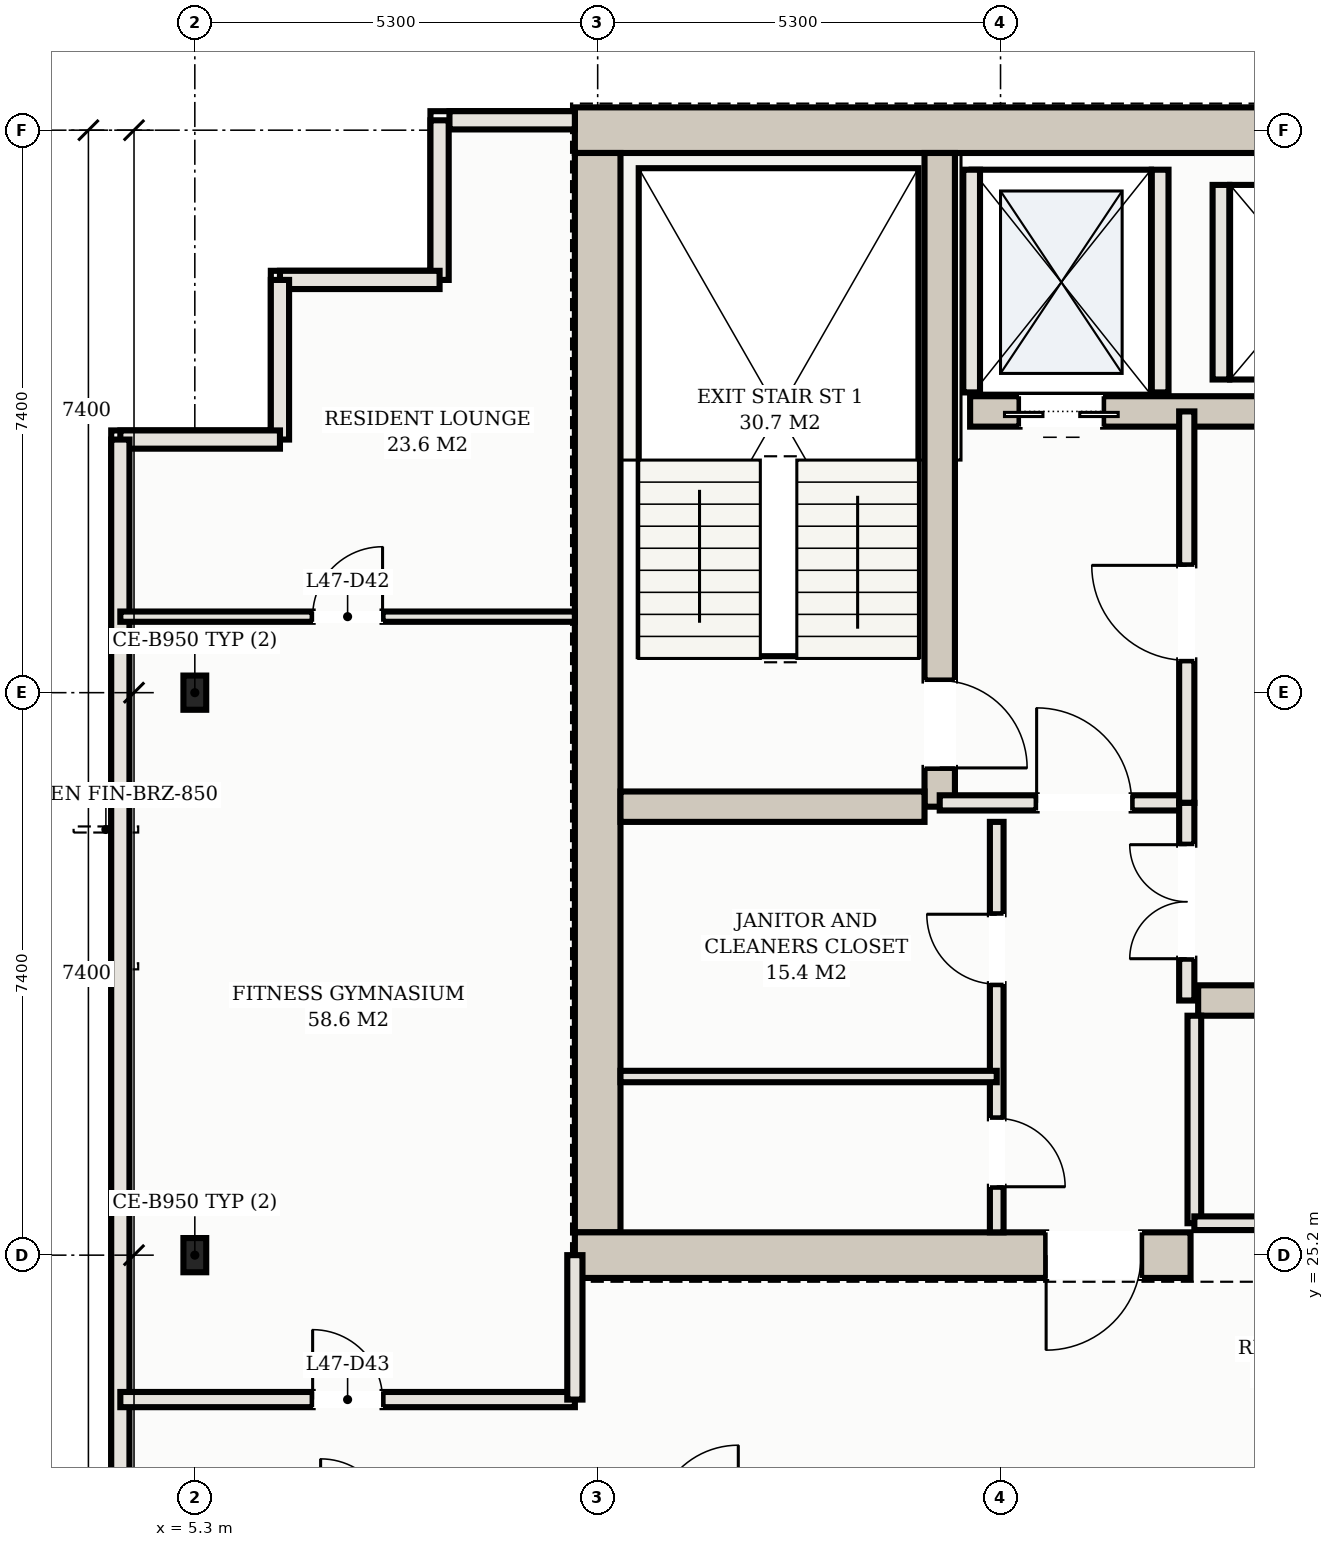
"""IFC4 building model, lengths in metres.
Left out: names, types, materials, properties, quantities, classifications, styles, units other than length and angle.
Written with IfcOpenShell. Run it as: python <this file> out.ifc"""

import sys

from ifc_helpers import new_model, si_unit, direction, frame, frame_2d, origin, origin_2d, place, context, subcontext, project, spatial, rectangle, hollow_rectangle, extrude, element, fill, save


model = new_model("IFC4")
c1 = context("Model", 3, precision=1e-05, world=origin(), true_north=direction((0.0, 1.0)))
c2 = subcontext(c1, "Body", "Model", "MODEL_VIEW")
j1 = project(units=[si_unit("LENGTHUNIT", "METRE"), si_unit("PLANEANGLEUNIT", "RADIAN")], contexts=[c1])
p1 = place(None, origin())
s1 = spatial("IfcSite", under=j1, at=p1, CompositionType="ELEMENT")
p2 = place(p1, origin())
s2 = spatial("IfcBuilding", under=s1, at=p2, CompositionType="ELEMENT")
p3 = place(p2, frame((0.0, 0.0, 172.2)))
s3 = spatial("IfcBuildingStorey", under=s2, at=p3, CompositionType="ELEMENT", Elevation=172.2)
p4 = place(p3, frame((10.3, 40.0, 0.0), z_axis=(0.0, 0.0, 1.0), x_axis=(1.0, 0.0, 0.0)))
e1 = element("IfcWall", 1, at=p4, inside=s3, PredefinedType="SHEAR", context=c2, shape_type="SweptSolid", body=[
    extrude(rectangle(XDim=32.4, YDim=0.6, at=frame_2d((16.2, 0.0))), origin(), (0.0, 0.0, 1.0), 3.1),
])
p5 = place(p3, frame((10.6, 25.5, 0.0), z_axis=(0.0, 0.0, 1.0), x_axis=(0.0, 1.0, 0.0)))
e2 = element("IfcWall", 2, at=p5, inside=s3, PredefinedType="SHEAR", context=c2, shape_type="SweptSolid", body=[
    extrude(rectangle(XDim=14.2, YDim=0.6, at=frame_2d((7.1, 0.0))), origin(), (0.0, 0.0, 1.0), 3.1),
])
p6 = place(p3, frame((10.3, 25.2, 0.0), z_axis=(0.0, 0.0, 1.0), x_axis=(1.0, 0.0, 0.0)))
e3 = element("IfcWall", 3, at=p6, inside=s3, PredefinedType="SHEAR", context=c2, shape_type="SweptSolid", body=[
    extrude(rectangle(XDim=8.1, YDim=0.6, at=frame_2d((4.05, 0.0))), origin(), (0.0, 0.0, 1.0), 3.1),
])
p7 = place(p6, frame((6.2, 0.0, 0.0)))
e4 = element("IfcOpeningElement", 4, at=p7, cuts=e3, PredefinedType="OPENING", context=c2, shape_type="SweptSolid", body=[
    extrude(rectangle(XDim=1.25, YDim=2.2, at=frame_2d((0.625, 1.1))), frame((0.0, 0.31, 0.0), z_axis=(0.0, -1.0, 0.0), x_axis=(1.0, 0.0, 0.0)), (0.0, 0.0, 1.0), 0.62),
])
p8 = place(p3, frame((15.1, 31.1, 0.0), z_axis=(0.0, 0.0, 1.0), x_axis=(0.0, 1.0, 0.0)))
e5 = element("IfcWall", 5, at=p8, inside=s3, PredefinedType="SHEAR", context=c2, shape_type="SweptSolid", body=[
    extrude(rectangle(XDim=8.6, YDim=0.4, at=frame_2d((4.3, 0.0))), origin(), (0.0, 0.0, 1.0), 3.1),
])
p9 = place(p8, frame((0.51, 0.0, 0.0)))
e6 = element("IfcOpeningElement", 6, at=p9, cuts=e5, PredefinedType="OPENING", context=c2, shape_type="SweptSolid", body=[
    extrude(rectangle(XDim=1.15, YDim=2.2, at=frame_2d((0.575, 1.1))), frame((0.0, 0.21, 0.0), z_axis=(0.0, -1.0, 0.0), x_axis=(1.0, 0.0, 0.0)), (0.0, 0.0, 1.0), 0.42),
])
p10 = place(p3, frame((10.9, 31.1, 0.0), z_axis=(0.0, 0.0, 1.0), x_axis=(1.0, 0.0, 0.0)))
e7 = element("IfcWall", 7, at=p10, inside=s3, PredefinedType="SHEAR", context=c2, shape_type="SweptSolid", body=[
    extrude(rectangle(XDim=4.0, YDim=0.4, at=frame_2d((2.0, 0.0))), origin(), (0.0, 0.0, 1.0), 3.1),
])
p11 = place(p3, frame((15.5, 36.3, 0.0), z_axis=(0.0, 0.0, 1.0), x_axis=(1.0, 0.0, 0.0)))
e8 = element("IfcWall", 8, at=p11, inside=s3, PredefinedType="SHEAR", context=c2, shape_type="SweptSolid", body=[
    extrude(rectangle(XDim=22.0, YDim=0.4, at=frame_2d((11.0, 0.0))), origin(), (0.0, 0.0, 1.0), 3.1),
])
p12 = place(p11, frame((0.65, 0.0, 0.0)))
e9 = element("IfcOpeningElement", 9, at=p12, cuts=e8, PredefinedType="OPENING", context=c2, shape_type="SweptSolid", body=[
    extrude(rectangle(XDim=1.1, YDim=2.15, at=frame_2d((0.55, 1.075))), frame((0.0, 0.21, 0.0), z_axis=(0.0, -1.0, 0.0), x_axis=(1.0, 0.0, 0.0)), (0.0, 0.0, 1.0), 0.42),
])
p13 = place(p11, frame((20.25, 0.0, 0.0)))
e10 = element("IfcOpeningElement", 10, at=p13, cuts=e8, PredefinedType="OPENING", context=c2, shape_type="SweptSolid", body=[
    extrude(rectangle(XDim=1.1, YDim=2.15, at=frame_2d((0.55, 1.075))), frame((0.0, 0.21, 0.0), z_axis=(0.0, -1.0, 0.0), x_axis=(1.0, 0.0, 0.0)), (0.0, 0.0, 1.0), 0.42),
])
p14 = place(p11, frame((17.05, 0.0, 0.0)))
e11 = element("IfcOpeningElement", 11, at=p14, cuts=e8, PredefinedType="OPENING", context=c2, shape_type="SweptSolid", body=[
    extrude(rectangle(XDim=1.3, YDim=2.2, at=frame_2d((0.65, 1.1))), frame((0.0, 0.21, 0.0), z_axis=(0.0, -1.0, 0.0), x_axis=(1.0, 0.0, 0.0)), (0.0, 0.0, 1.0), 0.42),
])
p15 = place(p3, frame((18.5, 28.55, 0.0), z_axis=(0.0, 0.0, 1.0), x_axis=(1.0, 0.0, 0.0)))
e12 = element("IfcWall", 12, at=p15, inside=s3, PredefinedType="SHEAR", context=c2, shape_type="SweptSolid", body=[
    extrude(rectangle(XDim=16.0, YDim=0.4, at=frame_2d((8.0, 0.0))), origin(), (0.0, 0.0, 1.0), 3.1),
])
p16 = place(p15, frame((8.95, 0.0, 0.0)))
e13 = element("IfcOpeningElement", 13, at=p16, cuts=e12, PredefinedType="OPENING", context=c2, shape_type="SweptSolid", body=[
    extrude(rectangle(XDim=1.1, YDim=2.15, at=frame_2d((0.55, 1.075))), frame((0.0, 0.21, 0.0), z_axis=(0.0, -1.0, 0.0), x_axis=(1.0, 0.0, 0.0)), (0.0, 0.0, 1.0), 0.42),
])
p17 = place(p15, frame((11.55, 0.0, 0.0)))
e14 = element("IfcOpeningElement", 14, at=p17, cuts=e12, PredefinedType="OPENING", context=c2, shape_type="SweptSolid", body=[
    extrude(rectangle(XDim=1.1, YDim=2.15, at=frame_2d((0.55, 1.075))), frame((0.0, 0.21, 0.0), z_axis=(0.0, -1.0, 0.0), x_axis=(1.0, 0.0, 0.0)), (0.0, 0.0, 1.0), 0.42),
])
p18 = place(p15, frame((14.15, 0.0, 0.0)))
e15 = element("IfcOpeningElement", 15, at=p18, cuts=e12, PredefinedType="OPENING", context=c2, shape_type="SweptSolid", body=[
    extrude(rectangle(XDim=1.1, YDim=2.15, at=frame_2d((0.55, 1.075))), frame((0.0, 0.21, 0.0), z_axis=(0.0, -1.0, 0.0), x_axis=(1.0, 0.0, 0.0)), (0.0, 0.0, 1.0), 0.42),
])
for number, where, z_axis, x_axis in (
    (16, (5.3, 25.2, 0.0), (0.0, 0.0, 1.0), (1.0, 0.0, 0.0)),
    (17, (5.3, 32.6, 0.0), (0.0, 0.0, 1.0), (1.0, 0.0, 0.0)),
):
    element("IfcColumn", number, at=place(p3, frame(where, z_axis=z_axis, x_axis=x_axis)), inside=s3, PredefinedType="COLUMN", context=c2, shape_type="SweptSolid", body=[
        extrude(hollow_rectangle(XDim=0.3, YDim=0.45, WallThickness=0.016, at=origin_2d()), origin(), (0.0, 0.0, 1.0), 3.3),
    ])
for number, where, z_axis, x_axis in (
    (18, (15.52, 36.55, 0.0), (0.0, 0.0, 1.0), (0.0, 1.0, 0.0)),
    (19, (18.0, 36.55, 0.0), (0.0, 0.0, 1.0), (0.0, 1.0, 0.0)),
):
    element("IfcWall", number, at=place(p3, frame(where, z_axis=z_axis, x_axis=x_axis)), inside=s3, PredefinedType="SOLIDWALL", context=c2, shape_type="SweptSolid", body=[
        extrude(rectangle(XDim=2.93, YDim=0.22, at=frame_2d((1.465, 0.0))), origin(), (0.0, 0.0, 1.0), 3.1),
    ])
p19 = place(p3, frame((18.8, 36.72, 0.0), z_axis=(0.0, 0.0, 1.0), x_axis=(0.0, 1.0, 0.0)))
e20 = element("IfcWall", 20, at=p19, inside=s3, PredefinedType="SOLIDWALL", context=c2, shape_type="SweptSolid", body=[
    extrude(rectangle(XDim=2.56, YDim=0.22, at=frame_2d((1.28, 0.0))), origin(), (0.0, 0.0, 1.0), 3.1),
])
p20 = place(p3, frame((10.3, 40.13, 0.0), z_axis=(0.0, 0.0, 1.0), x_axis=(-1.0, 0.0, 0.0)))
e21 = element("IfcWall", 21, at=p20, inside=s3, PredefinedType="SOLIDWALL", context=c2, shape_type="SweptSolid", body=[
    extrude(rectangle(XDim=1.65, YDim=0.24, at=frame_2d((0.825, 0.0))), origin(), (0.0, 0.0, 1.0), 3.1),
])
p21 = place(p3, frame((8.52, 40.13, 0.0), z_axis=(0.0, 0.0, 1.0), x_axis=(0.0, -1.0, 0.0)))
e22 = element("IfcWall", 22, at=p21, inside=s3, PredefinedType="SOLIDWALL", context=c2, shape_type="SweptSolid", body=[
    extrude(rectangle(XDim=2.1, YDim=0.24, at=frame_2d((1.05, 0.0))), origin(), (0.0, 0.0, 1.0), 3.1),
])
for number, where, z_axis, x_axis in (
    (23, (8.52, 38.03, 0.0), (0.0, 0.0, 1.0), (-1.0, 0.0, 0.0)),
    (24, (6.42, 38.03, 0.0), (0.0, 0.0, 1.0), (0.0, -1.0, 0.0)),
):
    element("IfcWall", number, at=place(p3, frame(where, z_axis=z_axis, x_axis=x_axis)), inside=s3, PredefinedType="SOLIDWALL", context=c2, shape_type="SweptSolid", body=[
        extrude(rectangle(XDim=2.1, YDim=0.24, at=frame_2d((1.05, 0.0))), origin(), (0.0, 0.0, 1.0), 3.1),
    ])
p22 = place(p3, frame((6.42, 35.93, 0.0), z_axis=(0.0, 0.0, 1.0), x_axis=(-1.0, 0.0, 0.0)))
e25 = element("IfcWall", 25, at=p22, inside=s3, PredefinedType="SOLIDWALL", context=c2, shape_type="SweptSolid", body=[
    extrude(rectangle(XDim=2.1, YDim=0.24, at=frame_2d((1.05, 0.0))), origin(), (0.0, 0.0, 1.0), 3.1),
])
p23 = place(p3, frame((4.32, 35.93, 0.0), z_axis=(0.0, 0.0, 1.0), x_axis=(0.0, -1.0, 0.0)))
e26 = element("IfcWall", 26, at=p23, inside=s3, PredefinedType="SOLIDWALL", context=c2, shape_type="SweptSolid", body=[
    extrude(rectangle(XDim=27.41, YDim=0.24, at=frame_2d((13.705, 0.0))), origin(), (0.0, 0.0, 1.0), 3.1),
])
p24 = place(p23, frame((17.13, 0.0, 0.0)))
e27 = element("IfcOpeningElement", 27, at=p24, cuts=e26, PredefinedType="OPENING", context=c2, shape_type="SweptSolid", body=[
    extrude(rectangle(XDim=1.8, YDim=2.2, at=frame_2d((0.9, 1.1))), frame((0.0, 0.13, 0.0), z_axis=(0.0, -1.0, 0.0), x_axis=(1.0, 0.0, 0.0)), (0.0, 0.0, 1.0), 0.26),
])
p25 = place(p3, frame((15.1, 31.15, 0.0), z_axis=(0.0, 0.0, 1.0), x_axis=(1.0, 0.0, 0.0)))
e28 = element("IfcWall", 28, at=p25, inside=s3, PredefinedType="PARTITIONING", context=c2, shape_type="SweptSolid", body=[
    extrude(rectangle(XDim=3.25, YDim=0.2, at=frame_2d((1.625, 0.0))), origin(), (0.0, 0.0, 1.0), 2.38),
])
p26 = place(p25, frame((1.275, 0.0, 0.0)))
e29 = element("IfcOpeningElement", 29, at=p26, cuts=e28, PredefinedType="OPENING", context=c2, shape_type="SweptSolid", body=[
    extrude(rectangle(XDim=1.25, YDim=2.2, at=frame_2d((0.625, 1.1))), frame((0.0, 0.11, 0.0), z_axis=(0.0, -1.0, 0.0), x_axis=(1.0, 0.0, 0.0)), (0.0, 0.0, 1.0), 0.22),
])
p27 = place(p3, frame((18.35, 31.15, 0.0), z_axis=(0.0, 0.0, 1.0), x_axis=(0.0, 1.0, 0.0)))
e30 = element("IfcWall", 30, at=p27, inside=s3, PredefinedType="PARTITIONING", context=c2, shape_type="SweptSolid", body=[
    extrude(rectangle(XDim=5.15, YDim=0.2, at=frame_2d((2.575, 0.0))), origin(), (0.0, 0.0, 1.0), 2.38),
])
p28 = place(p27, frame((1.875, 0.0, 0.0)))
e31 = element("IfcOpeningElement", 31, at=p28, cuts=e30, PredefinedType="OPENING", context=c2, shape_type="SweptSolid", body=[
    extrude(rectangle(XDim=1.25, YDim=2.2, at=frame_2d((0.625, 1.1))), frame((0.0, 0.11, 0.0), z_axis=(0.0, -1.0, 0.0), x_axis=(1.0, 0.0, 0.0)), (0.0, 0.0, 1.0), 0.22),
])
p29 = place(p3, frame((15.85, 25.5, 0.0), z_axis=(0.0, 0.0, 1.0), x_axis=(0.0, 1.0, 0.0)))
e32 = element("IfcWall", 32, at=p29, inside=s3, PredefinedType="PARTITIONING", context=c2, shape_type="SweptSolid", body=[
    extrude(rectangle(XDim=5.4, YDim=0.18, at=frame_2d((2.7, 0.0))), origin(), (0.0, 0.0, 1.0), 2.38),
])
p30 = place(p29, frame((0.6, 0.0, 0.0)))
e33 = element("IfcOpeningElement", 33, at=p30, cuts=e32, PredefinedType="OPENING", context=c2, shape_type="SweptSolid", body=[
    extrude(rectangle(XDim=0.9, YDim=2.15, at=frame_2d((0.45, 1.075))), frame((0.0, 0.1, 0.0), z_axis=(0.0, -1.0, 0.0), x_axis=(1.0, 0.0, 0.0)), (0.0, 0.0, 1.0), 0.2),
])
p31 = place(p29, frame((3.265, 0.0, 0.0)))
e34 = element("IfcOpeningElement", 34, at=p31, cuts=e32, PredefinedType="OPENING", context=c2, shape_type="SweptSolid", body=[
    extrude(rectangle(XDim=0.92, YDim=2.15, at=frame_2d((0.46, 1.075))), frame((0.0, 0.1, 0.0), z_axis=(0.0, -1.0, 0.0), x_axis=(1.0, 0.0, 0.0)), (0.0, 0.0, 1.0), 0.2),
])
p32 = place(p3, frame((10.9, 27.55, 0.0), z_axis=(0.0, 0.0, 1.0), x_axis=(1.0, 0.0, 0.0)))
e35 = element("IfcWall", 35, at=p32, inside=s3, PredefinedType="PARTITIONING", context=c2, shape_type="SweptSolid", body=[
    extrude(rectangle(XDim=4.95, YDim=0.15, at=frame_2d((2.475, 0.0))), origin(), (0.0, 0.0, 1.0), 2.38),
])
p33 = place(p3, frame((18.35, 28.55, 0.0), z_axis=(0.0, 0.0, 1.0), x_axis=(0.0, 1.0, 0.0)))
e36 = element("IfcWall", 36, at=p33, inside=s3, PredefinedType="PARTITIONING", context=c2, shape_type="SweptSolid", body=[
    extrude(rectangle(XDim=2.6, YDim=0.2, at=frame_2d((1.3, 0.0))), origin(), (0.0, 0.0, 1.0), 2.38),
])
p34 = place(p33, frame((0.55, 0.0, 0.0)))
e37 = element("IfcOpeningElement", 37, at=p34, cuts=e36, PredefinedType="OPENING", context=c2, shape_type="SweptSolid", body=[
    extrude(rectangle(XDim=1.5, YDim=2.25, at=frame_2d((0.75, 1.125))), frame((0.0, 0.11, 0.0), z_axis=(0.0, -1.0, 0.0), x_axis=(1.0, 0.0, 0.0)), (0.0, 0.0, 1.0), 0.22),
])
p35 = place(p3, frame((18.45, 25.62, 0.0), z_axis=(0.0, 0.0, 1.0), x_axis=(0.0, 1.0, 0.0)))
e38 = element("IfcWall", 38, at=p35, inside=s3, PredefinedType="PARTITIONING", context=c2, shape_type="SweptSolid", body=[
    extrude(rectangle(XDim=2.73, YDim=0.18, at=frame_2d((1.365, 0.0))), origin(), (0.0, 0.0, 1.0), 2.38),
])
p36 = place(p3, frame((18.45, 25.62, 0.0), z_axis=(0.0, 0.0, 1.0), x_axis=(1.0, 0.0, 0.0)))
e39 = element("IfcWall", 39, at=p36, inside=s3, PredefinedType="PARTITIONING", context=c2, shape_type="SweptSolid", body=[
    extrude(rectangle(XDim=7.9, YDim=0.18, at=frame_2d((3.95, 0.0))), origin(), (0.0, 0.0, 1.0), 2.38),
])
p37 = place(p36, frame((3.34, 0.0, 0.0)))
e40 = element("IfcOpeningElement", 40, at=p37, cuts=e39, PredefinedType="OPENING", context=c2, shape_type="SweptSolid", body=[
    extrude(rectangle(XDim=0.92, YDim=2.15, at=frame_2d((0.46, 1.075))), frame((0.0, 0.1, 0.0), z_axis=(0.0, -1.0, 0.0), x_axis=(1.0, 0.0, 0.0)), (0.0, 0.0, 1.0), 0.2),
])
p38 = place(p3, frame((4.32, 23.3, 0.0), z_axis=(0.0, 0.0, 1.0), x_axis=(1.0, 0.0, 0.0)))
e41 = element("IfcWall", 41, at=p38, inside=s3, PredefinedType="PARTITIONING", context=c2, shape_type="SweptSolid", body=[
    extrude(rectangle(XDim=5.98, YDim=0.2, at=frame_2d((2.99, 0.0))), origin(), (0.0, 0.0, 1.0), 2.38),
])
p39 = place(p38, frame((2.53, 0.0, 0.0)))
e42 = element("IfcOpeningElement", 42, at=p39, cuts=e41, PredefinedType="OPENING", context=c2, shape_type="SweptSolid", body=[
    extrude(rectangle(XDim=0.92, YDim=2.15, at=frame_2d((0.46, 1.075))), frame((0.0, 0.11, 0.0), z_axis=(0.0, -1.0, 0.0), x_axis=(1.0, 0.0, 0.0)), (0.0, 0.0, 1.0), 0.22),
])
p40 = place(p3, frame((10.3, 23.3, 0.0), z_axis=(0.0, 0.0, 1.0), x_axis=(0.0, 1.0, 0.0)))
e43 = element("IfcWall", 43, at=p40, inside=s3, PredefinedType="PARTITIONING", context=c2, shape_type="SweptSolid", body=[
    extrude(rectangle(XDim=1.9, YDim=0.2, at=frame_2d((0.95, 0.0))), origin(), (0.0, 0.0, 1.0), 2.38),
])
p41 = place(p3, frame((4.32, 33.6, 0.0), z_axis=(0.0, 0.0, 1.0), x_axis=(1.0, 0.0, 0.0)))
e44 = element("IfcWall", 44, at=p41, inside=s3, PredefinedType="PARTITIONING", context=c2, shape_type="SweptSolid", body=[
    extrude(rectangle(XDim=5.98, YDim=0.135, at=frame_2d((2.99, 0.0))), origin(), (0.0, 0.0, 1.0), 2.38),
])
p42 = place(p41, frame((2.53, 0.0, 0.0)))
e45 = element("IfcOpeningElement", 45, at=p42, cuts=e44, PredefinedType="OPENING", context=c2, shape_type="SweptSolid", body=[
    extrude(rectangle(XDim=0.92, YDim=2.15, at=frame_2d((0.46, 1.075))), frame((0.0, 0.078, 0.0), z_axis=(0.0, -1.0, 0.0), x_axis=(1.0, 0.0, 0.0)), (0.0, 0.0, 1.0), 0.155),
])
p43 = place(p12, frame((1.1, 0.0, 0.0), z_axis=(0.0, 0.0, 1.0), x_axis=(-1.0, 0.0, 0.0)))
e46 = element("IfcDoor", 46, at=p43, inside=s3, OperationType="DOUBLE_DOOR_SLIDING", PredefinedType="DOOR", context=c2, shape_type="SweptSolid", body=[
    extrude(rectangle(XDim=1.1, YDim=2.15, at=frame_2d((0.55, 1.075))), frame((0.0, 0.025, 0.0), z_axis=(0.0, -1.0, 0.0), x_axis=(1.0, 0.0, 0.0)), (0.0, 0.0, 1.0), 0.05),
])
fill(e9, e46)
p44 = place(p7, frame((1.25, 0.0, 0.0), z_axis=(0.0, 0.0, 1.0), x_axis=(-1.0, 0.0, 0.0)))
e47 = element("IfcDoor", 47, at=p44, inside=s3, OperationType="SINGLE_SWING_RIGHT", PredefinedType="DOOR", context=c2, shape_type="SweptSolid", body=[
    extrude(rectangle(XDim=1.25, YDim=2.2, at=frame_2d((0.625, 1.1))), frame((0.0, 0.025, 0.0), z_axis=(0.0, -1.0, 0.0), x_axis=(1.0, 0.0, 0.0)), (0.0, 0.0, 1.0), 0.05),
])
fill(e4, e47)
p45 = place(p26, origin())
e48 = element("IfcDoor", 48, at=p45, inside=s3, OperationType="SINGLE_SWING_LEFT", PredefinedType="DOOR", context=c2, shape_type="SweptSolid", body=[
    extrude(rectangle(XDim=1.25, YDim=2.2, at=frame_2d((0.625, 1.1))), frame((0.0, 0.025, 0.0), z_axis=(0.0, -1.0, 0.0), x_axis=(1.0, 0.0, 0.0)), (0.0, 0.0, 1.0), 0.05),
])
fill(e29, e48)
p46 = place(p28, origin())
e49 = element("IfcDoor", 49, at=p46, inside=s3, OperationType="SINGLE_SWING_RIGHT", PredefinedType="DOOR", context=c2, shape_type="SweptSolid", body=[
    extrude(rectangle(XDim=1.25, YDim=2.2, at=frame_2d((0.625, 1.1))), frame((0.0, 0.025, 0.0), z_axis=(0.0, -1.0, 0.0), x_axis=(1.0, 0.0, 0.0)), (0.0, 0.0, 1.0), 0.05),
])
fill(e31, e49)
p47 = place(p9, frame((1.15, 0.0, 0.0), z_axis=(0.0, 0.0, 1.0), x_axis=(-1.0, 0.0, 0.0)))
e50 = element("IfcDoor", 50, at=p47, inside=s3, OperationType="SINGLE_SWING_RIGHT", PredefinedType="DOOR", context=c2, shape_type="SweptSolid", body=[
    extrude(rectangle(XDim=1.15, YDim=2.2, at=frame_2d((0.575, 1.1))), frame((0.0, 0.025, 0.0), z_axis=(0.0, -1.0, 0.0), x_axis=(1.0, 0.0, 0.0)), (0.0, 0.0, 1.0), 0.05),
])
fill(e6, e50)
p48 = place(p30, frame((0.9, 0.0, 0.0), z_axis=(0.0, 0.0, 1.0), x_axis=(-1.0, 0.0, 0.0)))
e51 = element("IfcDoor", 51, at=p48, inside=s3, OperationType="SINGLE_SWING_RIGHT", PredefinedType="DOOR", context=c2, shape_type="SweptSolid", body=[
    extrude(rectangle(XDim=0.9, YDim=2.15, at=frame_2d((0.45, 1.075))), frame((0.0, 0.025, 0.0), z_axis=(0.0, -1.0, 0.0), x_axis=(1.0, 0.0, 0.0)), (0.0, 0.0, 1.0), 0.05),
])
fill(e33, e51)
p49 = place(p31, origin())
e52 = element("IfcDoor", 52, at=p49, inside=s3, OperationType="SINGLE_SWING_RIGHT", PredefinedType="DOOR", context=c2, shape_type="SweptSolid", body=[
    extrude(rectangle(XDim=0.92, YDim=2.15, at=frame_2d((0.46, 1.075))), frame((0.0, 0.025, 0.0), z_axis=(0.0, -1.0, 0.0), x_axis=(1.0, 0.0, 0.0)), (0.0, 0.0, 1.0), 0.05),
])
fill(e34, e52)
p50 = place(p34, origin())
e53 = element("IfcDoor", 53, at=p50, inside=s3, OperationType="DOUBLE_DOOR_SINGLE_SWING", PredefinedType="DOOR", context=c2, shape_type="SweptSolid", body=[
    extrude(rectangle(XDim=1.5, YDim=2.25, at=frame_2d((0.75, 1.125))), frame((0.0, 0.025, 0.0), z_axis=(0.0, -1.0, 0.0), x_axis=(1.0, 0.0, 0.0)), (0.0, 0.0, 1.0), 0.05),
])
fill(e37, e53)
p51 = place(p42, origin())
e54 = element("IfcDoor", 54, at=p51, inside=s3, OperationType="SINGLE_SWING_RIGHT", PredefinedType="DOOR", context=c2, shape_type="SweptSolid", body=[
    extrude(rectangle(XDim=0.92, YDim=2.15, at=frame_2d((0.46, 1.075))), frame((0.0, 0.025, 0.0), z_axis=(0.0, -1.0, 0.0), x_axis=(1.0, 0.0, 0.0)), (0.0, 0.0, 1.0), 0.05),
])
fill(e45, e54)
p52 = place(p39, origin())
e55 = element("IfcDoor", 55, at=p52, inside=s3, OperationType="SINGLE_SWING_LEFT", PredefinedType="DOOR", context=c2, shape_type="SweptSolid", body=[
    extrude(rectangle(XDim=0.92, YDim=2.15, at=frame_2d((0.46, 1.075))), frame((0.0, 0.025, 0.0), z_axis=(0.0, -1.0, 0.0), x_axis=(1.0, 0.0, 0.0)), (0.0, 0.0, 1.0), 0.05),
])
fill(e42, e55)
save(model, sys.argv[1])
